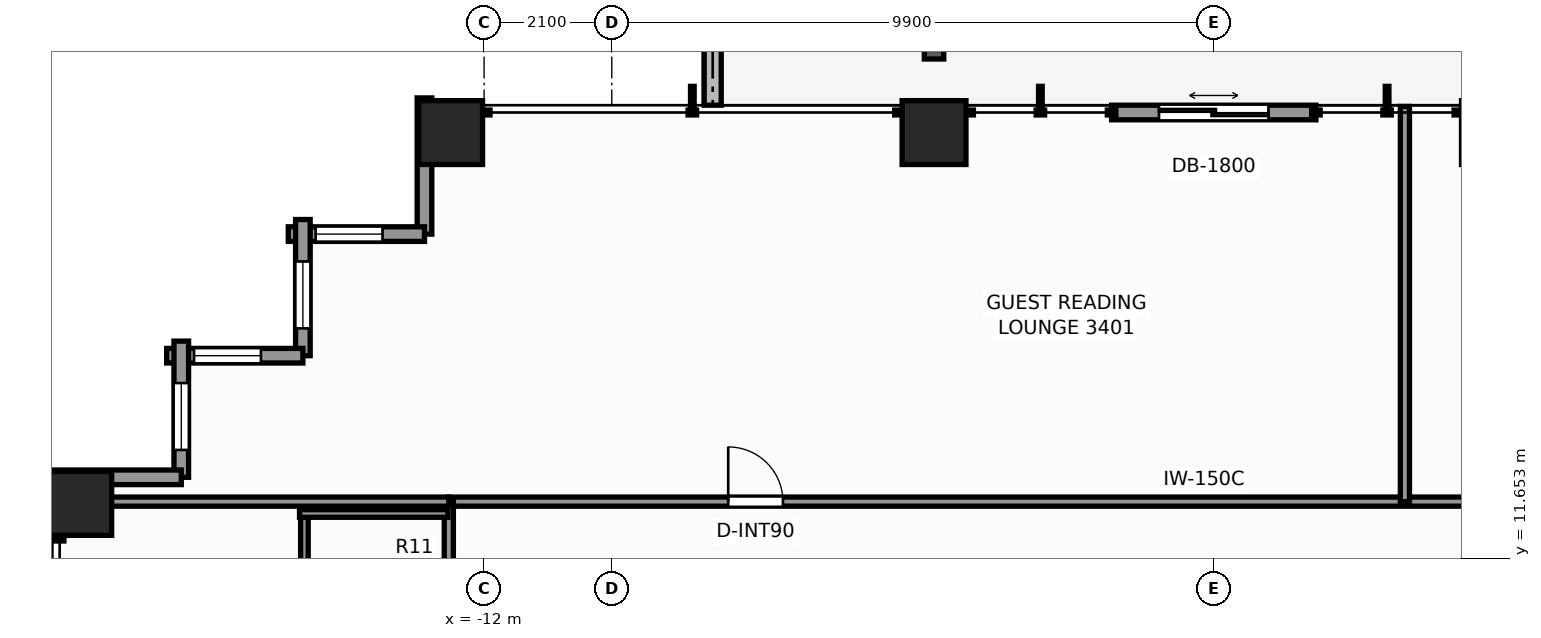
"""IFC4 building model, lengths in metres.
Left out: names, types, materials, properties, quantities, classifications, styles, units other than length and angle.
Written with IfcOpenShell. Run it as: python <this file> out.ifc"""

import sys

from ifc_helpers import new_model, si_unit, direction, frame, frame_2d, origin, origin_2d, place, context, subcontext, project, spatial, rectangle, extrude, element, fill, save


model = new_model("IFC4")
c1 = context("Model", 3, precision=1e-05, world=origin(), true_north=direction((0.0, 1.0)))
c2 = subcontext(c1, "Body", "Model", "MODEL_VIEW")
j1 = project(units=[si_unit("LENGTHUNIT", "METRE"), si_unit("PLANEANGLEUNIT", "RADIAN")], contexts=[c1])
p1 = place(None, origin())
s1 = spatial("IfcSite", under=j1, at=p1, CompositionType="ELEMENT")
p2 = place(p1, origin())
s2 = spatial("IfcBuilding", under=s1, at=p2, CompositionType="ELEMENT")
p3 = place(p2, frame((0.0, 0.0, 118.4)))
s3 = spatial("IfcBuildingStorey", under=s2, at=p3, CompositionType="ELEMENT", Elevation=118.4)
for number, where, z_axis, x_axis in (
    (1, (-12.55, 18.65, 0.0), (0.0, 0.0, 1.0), (1.0, 0.0, 0.0)),
    (2, (-4.6, 18.65, 0.0), (0.0, 0.0, 1.0), (1.0, 0.0, 0.0)),
    (3, (-18.65, 12.55, 0.0), (0.0, 0.0, 1.0), (1.0, 0.0, 0.0)),
):
    element("IfcColumn", number, at=place(p3, frame(where, z_axis=z_axis, x_axis=x_axis)), inside=s3, PredefinedType="COLUMN", context=c2, shape_type="SweptSolid", body=[
        extrude(rectangle(XDim=1.05, YDim=1.05, at=origin_2d()), origin(), (0.0, 0.0, 1.0), 3.3),
    ])
p4 = place(p3, frame((-8.24, 20.413, -0.04), z_axis=(0.0, 0.0, 1.0), x_axis=(0.0, -1.0, 0.0)))
e4 = element("IfcWall", 4, at=p4, inside=s3, PredefinedType="PARAPET", context=c2, shape_type="SweptSolid", body=[
    extrude(rectangle(XDim=1.313, YDim=0.28, at=frame_2d((0.656, 0.0))), origin(), (0.0, 0.0, 1.0), 0.42),
])
p5 = place(p3, frame((-1.68, 18.98, 0.0), z_axis=(0.0, 0.0, 1.0), x_axis=(1.0, 0.0, 0.0)))
e5 = element("IfcWall", 5, at=p5, inside=s3, PredefinedType="STANDARD", context=c2, shape_type="SweptSolid", body=[
    extrude(rectangle(XDim=3.36, YDim=0.24, at=frame_2d((1.68, 0.0))), origin(), (0.0, 0.0, 1.0), 3.08),
])
p6 = place(p5, frame((0.78, 0.0, 0.0)))
e6 = element("IfcOpeningElement", 6, at=p6, cuts=e5, PredefinedType="OPENING", context=c2, shape_type="SweptSolid", body=[
    extrude(rectangle(XDim=1.8, YDim=2.2, at=frame_2d((0.9, 1.1))), frame((0.0, 0.13, 0.0), z_axis=(0.0, -1.0, 0.0), x_axis=(1.0, 0.0, 0.0)), (0.0, 0.0, 1.0), 0.26),
])
p7 = place(p3, frame((-12.98, 16.98, 0.0), z_axis=(0.0, 0.0, 1.0), x_axis=(0.0, 1.0, 0.0)))
e7 = element("IfcWall", 7, at=p7, inside=s3, PredefinedType="STANDARD", context=c2, shape_type="SweptSolid", body=[
    extrude(rectangle(XDim=2.24, YDim=0.24, at=frame_2d((1.12, 0.0))), origin(), (0.0, 0.0, 1.0), 2.459),
])
p8 = place(p3, frame((-15.22, 16.98, 0.0), z_axis=(0.0, 0.0, 1.0), x_axis=(1.0, 0.0, 0.0)))
e8 = element("IfcWall", 8, at=p8, inside=s3, PredefinedType="STANDARD", context=c2, shape_type="SweptSolid", body=[
    extrude(rectangle(XDim=2.24, YDim=0.24, at=frame_2d((1.12, 0.0))), origin(), (0.0, 0.0, 1.0), 2.459),
])
p9 = place(p8, frame((0.45, 0.0, 0.65)))
e9 = element("IfcOpeningElement", 9, at=p9, cuts=e8, PredefinedType="OPENING", context=c2, shape_type="SweptSolid", body=[
    extrude(rectangle(XDim=1.1, YDim=1.45, at=frame_2d((0.55, 0.725))), frame((0.0, 0.13, 0.0), z_axis=(0.0, -1.0, 0.0), x_axis=(1.0, 0.0, 0.0)), (0.0, 0.0, 1.0), 0.26),
])
p10 = place(p3, frame((-14.98, 14.98, 0.0), z_axis=(0.0, 0.0, 1.0), x_axis=(0.0, 1.0, 0.0)))
e10 = element("IfcWall", 10, at=p10, inside=s3, PredefinedType="STANDARD", context=c2, shape_type="SweptSolid", body=[
    extrude(rectangle(XDim=2.24, YDim=0.24, at=frame_2d((1.12, 0.0))), origin(), (0.0, 0.0, 1.0), 2.459),
])
p11 = place(p10, frame((0.45, 0.0, 0.65)))
e11 = element("IfcOpeningElement", 11, at=p11, cuts=e10, PredefinedType="OPENING", context=c2, shape_type="SweptSolid", body=[
    extrude(rectangle(XDim=1.1, YDim=1.45, at=frame_2d((0.55, 0.725))), frame((0.0, 0.13, 0.0), z_axis=(0.0, -1.0, 0.0), x_axis=(1.0, 0.0, 0.0)), (0.0, 0.0, 1.0), 0.26),
])
p12 = place(p3, frame((-17.22, 14.98, 0.0), z_axis=(0.0, 0.0, 1.0), x_axis=(1.0, 0.0, 0.0)))
e12 = element("IfcWall", 12, at=p12, inside=s3, PredefinedType="STANDARD", context=c2, shape_type="SweptSolid", body=[
    extrude(rectangle(XDim=2.24, YDim=0.24, at=frame_2d((1.12, 0.0))), origin(), (0.0, 0.0, 1.0), 2.459),
])
p13 = place(p12, frame((0.45, 0.0, 0.65)))
e13 = element("IfcOpeningElement", 13, at=p13, cuts=e12, PredefinedType="OPENING", context=c2, shape_type="SweptSolid", body=[
    extrude(rectangle(XDim=1.1, YDim=1.45, at=frame_2d((0.55, 0.725))), frame((0.0, 0.13, 0.0), z_axis=(0.0, -1.0, 0.0), x_axis=(1.0, 0.0, 0.0)), (0.0, 0.0, 1.0), 0.26),
])
p14 = place(p3, frame((-16.98, 12.98, 0.0), z_axis=(0.0, 0.0, 1.0), x_axis=(0.0, 1.0, 0.0)))
e14 = element("IfcWall", 14, at=p14, inside=s3, PredefinedType="STANDARD", context=c2, shape_type="SweptSolid", body=[
    extrude(rectangle(XDim=2.24, YDim=0.24, at=frame_2d((1.12, 0.0))), origin(), (0.0, 0.0, 1.0), 2.459),
])
p15 = place(p14, frame((0.45, 0.0, 0.65)))
e15 = element("IfcOpeningElement", 15, at=p15, cuts=e14, PredefinedType="OPENING", context=c2, shape_type="SweptSolid", body=[
    extrude(rectangle(XDim=1.1, YDim=1.45, at=frame_2d((0.55, 0.725))), frame((0.0, 0.13, 0.0), z_axis=(0.0, -1.0, 0.0), x_axis=(1.0, 0.0, 0.0)), (0.0, 0.0, 1.0), 0.26),
])
p16 = place(p3, frame((-19.22, 12.98, 0.0), z_axis=(0.0, 0.0, 1.0), x_axis=(1.0, 0.0, 0.0)))
e16 = element("IfcWall", 16, at=p16, inside=s3, PredefinedType="STANDARD", context=c2, shape_type="SweptSolid", body=[
    extrude(rectangle(XDim=2.24, YDim=0.24, at=frame_2d((1.12, 0.0))), origin(), (0.0, 0.0, 1.0), 2.459),
])
p17 = place(p3, frame((-12.58, 12.58, 0.0), z_axis=(0.0, 0.0, 1.0), x_axis=(1.0, 0.0, 0.0)))
e17 = element("IfcWall", 17, at=p17, inside=s3, PredefinedType="PARTITIONING", context=c2, shape_type="SweptSolid", body=[
    extrude(rectangle(XDim=24.84, YDim=0.15, at=frame_2d((12.42, 0.0))), origin(), (0.0, 0.0, 1.0), 2.292),
])
p18 = place(p17, frame((4.595, 0.0, 0.0)))
e18 = element("IfcOpeningElement", 18, at=p18, cuts=e17, PredefinedType="OPENING", context=c2, shape_type="SweptSolid", body=[
    extrude(rectangle(XDim=0.9, YDim=2.06, at=frame_2d((0.45, 1.03))), frame((0.0, 0.085, 0.0), z_axis=(0.0, -1.0, 0.0), x_axis=(1.0, 0.0, 0.0)), (0.0, 0.0, 1.0), 0.17),
])
p19 = place(p17, frame((19.665, 0.0, 0.0)))
e19 = element("IfcOpeningElement", 19, at=p19, cuts=e17, PredefinedType="OPENING", context=c2, shape_type="SweptSolid", body=[
    extrude(rectangle(XDim=0.9, YDim=2.06, at=frame_2d((0.45, 1.03))), frame((0.0, 0.085, 0.0), z_axis=(0.0, -1.0, 0.0), x_axis=(1.0, 0.0, 0.0)), (0.0, 0.0, 1.0), 0.17),
])
p20 = place(p3, frame((-12.58, 7.4, 0.0), z_axis=(0.0, 0.0, 1.0), x_axis=(0.0, 1.0, 0.0)))
e20 = element("IfcWall", 20, at=p20, inside=s3, PredefinedType="PARTITIONING", context=c2, shape_type="SweptSolid", body=[
    extrude(rectangle(XDim=5.18, YDim=0.15, at=frame_2d((2.59, 0.0))), origin(), (0.0, 0.0, 1.0), 2.292),
])
p21 = place(p20, frame((0.787, 0.0, 0.0)))
e21 = element("IfcOpeningElement", 21, at=p21, cuts=e20, PredefinedType="OPENING", context=c2, shape_type="SweptSolid", body=[
    extrude(rectangle(XDim=0.95, YDim=2.06, at=frame_2d((0.475, 1.03))), frame((0.0, 0.085, 0.0), z_axis=(0.0, -1.0, 0.0), x_axis=(1.0, 0.0, 0.0)), (0.0, 0.0, 1.0), 0.17),
])
p22 = place(p3, frame((-19.08, 12.58, 0.0), z_axis=(0.0, 0.0, 1.0), x_axis=(1.0, 0.0, 0.0)))
e22 = element("IfcWall", 22, at=p22, inside=s3, PredefinedType="PARTITIONING", context=c2, shape_type="SweptSolid", body=[
    extrude(rectangle(XDim=6.5, YDim=0.15, at=frame_2d((3.25, 0.0))), origin(), (0.0, 0.0, 1.0), 2.292),
])
p23 = place(p3, frame((3.144, 12.58, 0.0), z_axis=(0.0, 0.0, 1.0), x_axis=(0.0, 1.0, 0.0)))
e23 = element("IfcWall", 23, at=p23, inside=s3, PredefinedType="PARTITIONING", context=c2, shape_type="SweptSolid", body=[
    extrude(rectangle(XDim=6.5, YDim=0.15, at=frame_2d((3.25, 0.0))), origin(), (0.0, 0.0, 1.0), 2.449),
])
p24 = place(p3, frame((-14.955, 10.175, 0.0), z_axis=(0.0, 0.0, 1.0), x_axis=(0.0, 1.0, 0.0)))
e24 = element("IfcWall", 24, at=p24, inside=s3, PredefinedType="PARTITIONING", context=c2, shape_type="SweptSolid", body=[
    extrude(rectangle(XDim=2.27, YDim=0.125, at=frame_2d((1.135, 0.0))), origin(), (0.0, 0.0, 1.0), 2.292),
])
p25 = place(p3, frame((-15.035, 12.385, 0.0), z_axis=(0.0, 0.0, 1.0), x_axis=(1.0, 0.0, 0.0)))
e25 = element("IfcWall", 25, at=p25, inside=s3, PredefinedType="PARTITIONING", context=c2, shape_type="SweptSolid", body=[
    extrude(rectangle(XDim=2.44, YDim=0.125, at=frame_2d((1.22, 0.0))), origin(), (0.0, 0.0, 1.0), 3.08),
])
p26 = place(p6, origin())
e26 = element("IfcDoor", 26, at=p26, inside=s3, OperationType="DOUBLE_DOOR_SLIDING", PredefinedType="DOOR", context=c2, shape_type="SweptSolid", body=[
    extrude(rectangle(XDim=1.8, YDim=2.2, at=frame_2d((0.9, 1.1))), frame((0.0, 0.025, 0.0), z_axis=(0.0, -1.0, 0.0), x_axis=(1.0, 0.0, 0.0)), (0.0, 0.0, 1.0), 0.05),
])
fill(e6, e26)
p27 = place(p9, origin())
e27 = element("IfcWindow", 27, at=p27, inside=s3, PartitioningType="SINGLE_PANEL", PredefinedType="WINDOW", context=c2, shape_type="SweptSolid", body=[
    extrude(rectangle(XDim=1.1, YDim=1.45, at=frame_2d((0.55, 0.725))), frame((0.0, 0.03, 0.0), z_axis=(0.0, -1.0, 0.0), x_axis=(1.0, 0.0, 0.0)), (0.0, 0.0, 1.0), 0.06),
])
fill(e9, e27)
p28 = place(p11, origin())
e28 = element("IfcWindow", 28, at=p28, inside=s3, PartitioningType="SINGLE_PANEL", PredefinedType="WINDOW", context=c2, shape_type="SweptSolid", body=[
    extrude(rectangle(XDim=1.1, YDim=1.45, at=frame_2d((0.55, 0.725))), frame((0.0, 0.03, 0.0), z_axis=(0.0, -1.0, 0.0), x_axis=(1.0, 0.0, 0.0)), (0.0, 0.0, 1.0), 0.06),
])
fill(e11, e28)
p29 = place(p13, origin())
e29 = element("IfcWindow", 29, at=p29, inside=s3, PartitioningType="SINGLE_PANEL", PredefinedType="WINDOW", context=c2, shape_type="SweptSolid", body=[
    extrude(rectangle(XDim=1.1, YDim=1.45, at=frame_2d((0.55, 0.725))), frame((0.0, 0.03, 0.0), z_axis=(0.0, -1.0, 0.0), x_axis=(1.0, 0.0, 0.0)), (0.0, 0.0, 1.0), 0.06),
])
fill(e13, e29)
p30 = place(p15, origin())
e30 = element("IfcWindow", 30, at=p30, inside=s3, PartitioningType="SINGLE_PANEL", PredefinedType="WINDOW", context=c2, shape_type="SweptSolid", body=[
    extrude(rectangle(XDim=1.1, YDim=1.45, at=frame_2d((0.55, 0.725))), frame((0.0, 0.03, 0.0), z_axis=(0.0, -1.0, 0.0), x_axis=(1.0, 0.0, 0.0)), (0.0, 0.0, 1.0), 0.06),
])
fill(e15, e30)
p31 = place(p18, origin())
e31 = element("IfcDoor", 31, at=p31, inside=s3, OperationType="SINGLE_SWING_LEFT", PredefinedType="DOOR", context=c2, shape_type="SweptSolid", body=[
    extrude(rectangle(XDim=0.9, YDim=2.06, at=frame_2d((0.45, 1.03))), frame((0.0, 0.025, 0.0), z_axis=(0.0, -1.0, 0.0), x_axis=(1.0, 0.0, 0.0)), (0.0, 0.0, 1.0), 0.05),
])
fill(e18, e31)
save(model, sys.argv[1])
